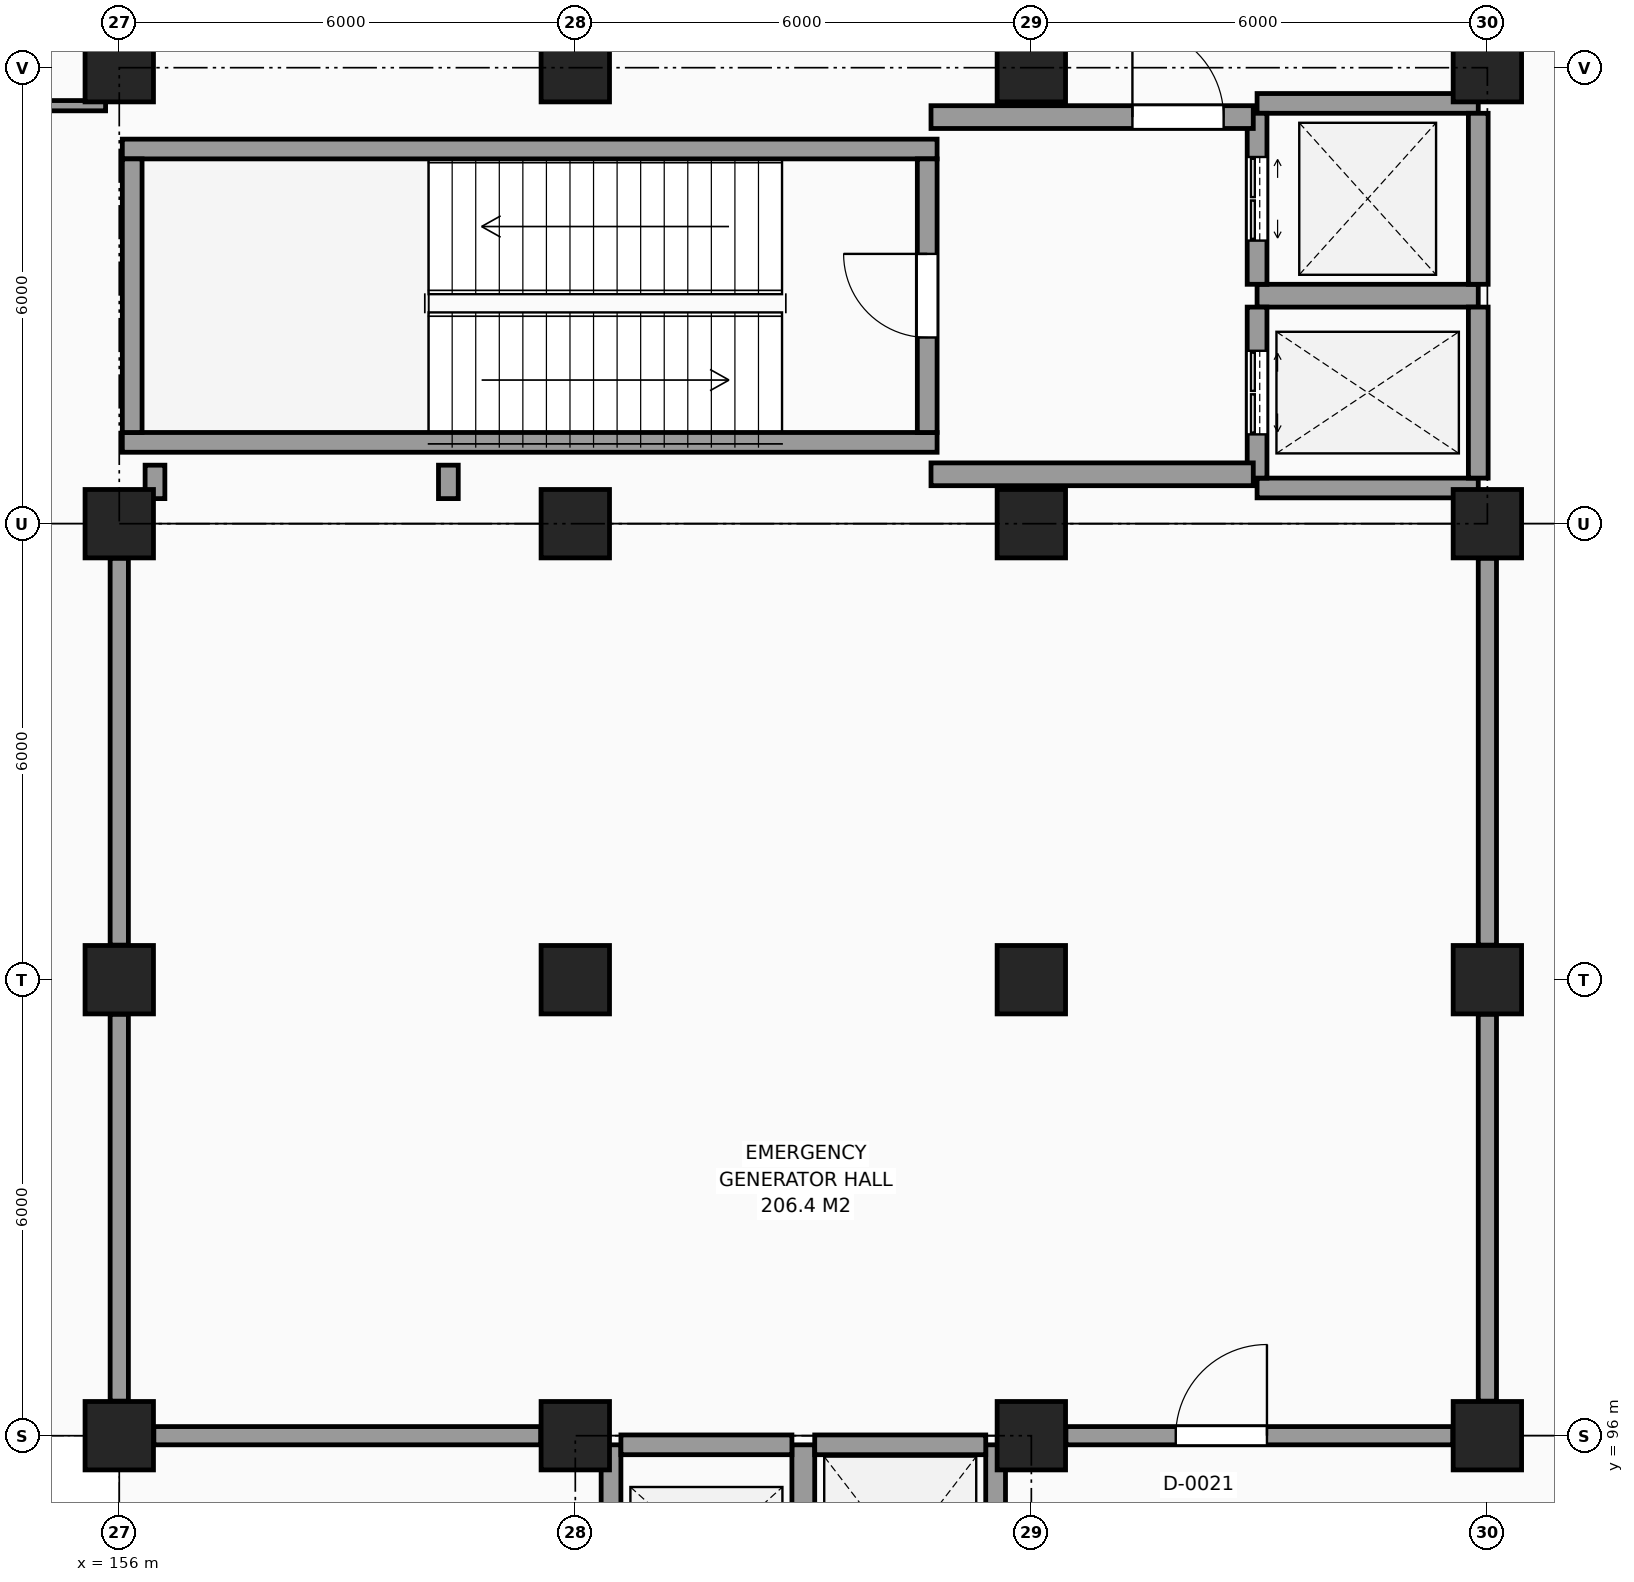
"""IFC4 building model, lengths in metres.
Left out: names, types, materials, properties, quantities, classifications, styles, units other than length and angle.
Written with IfcOpenShell. Run it as: python <this file> out.ifc"""

import sys

from ifc_helpers import new_model, si_unit, direction, frame, frame_2d, origin, origin_2d, place, context, subcontext, project, spatial, rectangle, extrude, element, fill, save


model = new_model("IFC4")
c1 = context("Model", 3, precision=1e-05, world=origin(), true_north=direction((0.0, 1.0)))
c2 = subcontext(c1, "Body", "Model", "MODEL_VIEW")
j1 = project(units=[si_unit("LENGTHUNIT", "METRE"), si_unit("PLANEANGLEUNIT", "RADIAN")], contexts=[c1])
p1 = place(None, origin())
s1 = spatial("IfcSite", under=j1, at=p1, CompositionType="ELEMENT")
p2 = place(p1, origin())
s2 = spatial("IfcBuilding", under=s1, at=p2, CompositionType="ELEMENT")
p3 = place(p2, frame((0.0, 0.0, -4.8)))
s3 = spatial("IfcBuildingStorey", under=s2, at=p3, CompositionType="ELEMENT", Elevation=-4.8)
for number, where, z_axis, x_axis in (
    (1, (156.0, 96.0, 0.0), (0.0, 0.0, 1.0), (1.0, 0.0, 0.0)),
    (2, (156.0, 102.0, 0.0), (0.0, 0.0, 1.0), (1.0, 0.0, 0.0)),
    (3, (156.0, 108.0, 0.0), (0.0, 0.0, 1.0), (1.0, 0.0, 0.0)),
    (4, (156.0, 114.0, 0.0), (0.0, 0.0, 1.0), (1.0, 0.0, 0.0)),
    (5, (162.0, 96.0, 0.0), (0.0, 0.0, 1.0), (1.0, 0.0, 0.0)),
    (6, (162.0, 102.0, 0.0), (0.0, 0.0, 1.0), (1.0, 0.0, 0.0)),
    (7, (162.0, 108.0, 0.0), (0.0, 0.0, 1.0), (1.0, 0.0, 0.0)),
    (8, (162.0, 114.0, 0.0), (0.0, 0.0, 1.0), (1.0, 0.0, 0.0)),
    (9, (168.0, 96.0, 0.0), (0.0, 0.0, 1.0), (1.0, 0.0, 0.0)),
    (10, (168.0, 102.0, 0.0), (0.0, 0.0, 1.0), (1.0, 0.0, 0.0)),
    (11, (168.0, 108.0, 0.0), (0.0, 0.0, 1.0), (1.0, 0.0, 0.0)),
    (12, (168.0, 114.0, 0.0), (0.0, 0.0, 1.0), (1.0, 0.0, 0.0)),
    (13, (174.0, 96.0, 0.0), (0.0, 0.0, 1.0), (1.0, 0.0, 0.0)),
    (14, (174.0, 102.0, 0.0), (0.0, 0.0, 1.0), (1.0, 0.0, 0.0)),
    (15, (174.0, 108.0, 0.0), (0.0, 0.0, 1.0), (1.0, 0.0, 0.0)),
    (16, (174.0, 114.0, 0.0), (0.0, 0.0, 1.0), (1.0, 0.0, 0.0)),
):
    element("IfcColumn", number, at=place(p3, frame(where, z_axis=z_axis, x_axis=x_axis)), inside=s3, PredefinedType="COLUMN", context=c2, shape_type="SweptSolid", body=[
        extrude(rectangle(XDim=0.9, YDim=0.9, at=origin_2d()), origin(), (0.0, 0.0, 1.0), 4.8),
    ])
for number, where, z_axis, x_axis in (
    (17, (156.04, 109.07, -0.5), (0.0, 0.0, 1.0), (1.0, 0.0, 0.0)),
    (18, (156.04, 112.93, -0.5), (0.0, 0.0, 1.0), (1.0, 0.0, 0.0)),
):
    element("IfcWall", number, at=place(p3, frame(where, z_axis=z_axis, x_axis=x_axis)), inside=s3, PredefinedType="SHEAR", context=c2, shape_type="SweptSolid", body=[
        extrude(rectangle(XDim=10.72, YDim=0.26, at=frame_2d((5.36, 0.0))), origin(), (0.0, 0.0, 1.0), 5.3),
    ])
p4 = place(p3, frame((156.17, 109.2, -0.5), z_axis=(0.0, 0.0, 1.0), x_axis=(0.0, 1.0, 0.0)))
e19 = element("IfcWall", 19, at=p4, inside=s3, PredefinedType="SHEAR", context=c2, shape_type="SweptSolid", body=[
    extrude(rectangle(XDim=3.6, YDim=0.26, at=frame_2d((1.8, 0.0))), origin(), (0.0, 0.0, 1.0), 5.3),
])
p5 = place(p3, frame((166.63, 109.2, -0.5), z_axis=(0.0, 0.0, 1.0), x_axis=(0.0, 1.0, 0.0)))
e20 = element("IfcWall", 20, at=p5, inside=s3, PredefinedType="SHEAR", context=c2, shape_type="SweptSolid", body=[
    extrude(rectangle(XDim=3.6, YDim=0.26, at=frame_2d((1.8, 0.0))), origin(), (0.0, 0.0, 1.0), 5.3),
])
p6 = place(p5, frame((1.25, 0.0, 0.5)))
e21 = element("IfcOpeningElement", 21, at=p6, cuts=e20, PredefinedType="OPENING", context=c2, shape_type="SweptSolid", body=[
    extrude(rectangle(XDim=1.1, YDim=2.15, at=frame_2d((0.55, 1.075))), frame((0.0, 0.14, 0.0), z_axis=(0.0, -1.0, 0.0), x_axis=(1.0, 0.0, 0.0)), (0.0, 0.0, 1.0), 0.28),
])
p7 = place(p3, frame((170.97, 108.47, -0.5), z_axis=(0.0, 0.0, 1.0), x_axis=(1.0, 0.0, 0.0)))
e22 = element("IfcWall", 22, at=p7, inside=s3, PredefinedType="SHEAR", context=c2, shape_type="SweptSolid", body=[
    extrude(rectangle(XDim=2.91, YDim=0.26, at=frame_2d((1.455, 0.0))), origin(), (0.0, 0.0, 1.0), 5.3),
])
p8 = place(p3, frame((170.97, 111.0, -0.5), z_axis=(0.0, 0.0, 1.0), x_axis=(1.0, 0.0, 0.0)))
e23 = element("IfcWall", 23, at=p8, inside=s3, PredefinedType="SHEAR", context=c2, shape_type="SweptSolid", body=[
    extrude(rectangle(XDim=2.91, YDim=0.3, at=frame_2d((1.455, 0.0))), origin(), (0.0, 0.0, 1.0), 5.3),
])
p9 = place(p3, frame((173.88, 108.6, -0.5), z_axis=(0.0, 0.0, 1.0), x_axis=(0.0, 1.0, 0.0)))
e24 = element("IfcWall", 24, at=p9, inside=s3, PredefinedType="SHEAR", context=c2, shape_type="SweptSolid", body=[
    extrude(rectangle(XDim=2.25, YDim=0.26, at=frame_2d((1.125, 0.0))), origin(), (0.0, 0.0, 1.0), 5.3),
])
p10 = place(p3, frame((170.97, 108.6, -0.5), z_axis=(0.0, 0.0, 1.0), x_axis=(0.0, 1.0, 0.0)))
e25 = element("IfcWall", 25, at=p10, inside=s3, PredefinedType="SHEAR", context=c2, shape_type="SweptSolid", body=[
    extrude(rectangle(XDim=2.25, YDim=0.26, at=frame_2d((1.125, 0.0))), origin(), (0.0, 0.0, 1.0), 5.3),
])
p11 = place(p10, frame((0.575, 0.0, 0.5)))
e26 = element("IfcOpeningElement", 26, at=p11, cuts=e25, PredefinedType="OPENING", context=c2, shape_type="SweptSolid", body=[
    extrude(rectangle(XDim=1.1, YDim=2.2, at=frame_2d((0.55, 1.1))), frame((0.0, 0.14, 0.0), z_axis=(0.0, -1.0, 0.0), x_axis=(1.0, 0.0, 0.0)), (0.0, 0.0, 1.0), 0.28),
])
p12 = place(p3, frame((170.97, 113.53, -0.5), z_axis=(0.0, 0.0, 1.0), x_axis=(1.0, 0.0, 0.0)))
e27 = element("IfcWall", 27, at=p12, inside=s3, PredefinedType="SHEAR", context=c2, shape_type="SweptSolid", body=[
    extrude(rectangle(XDim=2.91, YDim=0.26, at=frame_2d((1.455, 0.0))), origin(), (0.0, 0.0, 1.0), 5.3),
])
p13 = place(p3, frame((173.88, 111.15, -0.5), z_axis=(0.0, 0.0, 1.0), x_axis=(0.0, 1.0, 0.0)))
e28 = element("IfcWall", 28, at=p13, inside=s3, PredefinedType="SHEAR", context=c2, shape_type="SweptSolid", body=[
    extrude(rectangle(XDim=2.25, YDim=0.26, at=frame_2d((1.125, 0.0))), origin(), (0.0, 0.0, 1.0), 5.3),
])
p14 = place(p3, frame((170.97, 111.15, -0.5), z_axis=(0.0, 0.0, 1.0), x_axis=(0.0, 1.0, 0.0)))
e29 = element("IfcWall", 29, at=p14, inside=s3, PredefinedType="SHEAR", context=c2, shape_type="SweptSolid", body=[
    extrude(rectangle(XDim=2.25, YDim=0.26, at=frame_2d((1.125, 0.0))), origin(), (0.0, 0.0, 1.0), 5.3),
])
p15 = place(p14, frame((0.575, 0.0, 0.5)))
e30 = element("IfcOpeningElement", 30, at=p15, cuts=e29, PredefinedType="OPENING", context=c2, shape_type="SweptSolid", body=[
    extrude(rectangle(XDim=1.1, YDim=2.2, at=frame_2d((0.55, 1.1))), frame((0.0, 0.14, 0.0), z_axis=(0.0, -1.0, 0.0), x_axis=(1.0, 0.0, 0.0)), (0.0, 0.0, 1.0), 0.28),
])
for number, where, z_axis, x_axis in (
    (31, (156.47, 108.33, -0.5), (0.0, 0.0, 1.0), (0.0, 1.0, 0.0)),
    (32, (160.33, 108.33, -0.5), (0.0, 0.0, 1.0), (0.0, 1.0, 0.0)),
):
    element("IfcWall", number, at=place(p3, frame(where, z_axis=z_axis, x_axis=x_axis)), inside=s3, PredefinedType="SHEAR", context=c2, shape_type="SweptSolid", body=[
        extrude(rectangle(XDim=0.44, YDim=0.26, at=frame_2d((0.22, 0.0))), origin(), (0.0, 0.0, 1.0), 5.3),
    ])
p16 = place(p3, frame((166.68, 113.35, -0.5), z_axis=(0.0, 0.0, 1.0), x_axis=(1.0, 0.0, 0.0)))
e33 = element("IfcWall", 33, at=p16, inside=s3, PredefinedType="SHEAR", context=c2, shape_type="SweptSolid", body=[
    extrude(rectangle(XDim=4.24, YDim=0.3, at=frame_2d((2.12, 0.0))), origin(), (0.0, 0.0, 1.0), 5.3),
])
p17 = place(p16, frame((2.65, 0.0, 0.5)))
e34 = element("IfcOpeningElement", 34, at=p17, cuts=e33, PredefinedType="OPENING", context=c2, shape_type="SweptSolid", body=[
    extrude(rectangle(XDim=1.2, YDim=2.2, at=frame_2d((0.6, 1.1))), frame((0.0, 0.16, 0.0), z_axis=(0.0, -1.0, 0.0), x_axis=(1.0, 0.0, 0.0)), (0.0, 0.0, 1.0), 0.32),
])
p18 = place(p3, frame((166.68, 108.65, -0.5), z_axis=(0.0, 0.0, 1.0), x_axis=(1.0, 0.0, 0.0)))
e35 = element("IfcWall", 35, at=p18, inside=s3, PredefinedType="SHEAR", context=c2, shape_type="SweptSolid", body=[
    extrude(rectangle(XDim=4.24, YDim=0.3, at=frame_2d((2.12, 0.0))), origin(), (0.0, 0.0, 1.0), 5.3),
])
p19 = place(p3, frame((162.47, 92.97, -0.5), z_axis=(0.0, 0.0, 1.0), x_axis=(0.0, 1.0, 0.0)))
e36 = element("IfcWall", 36, at=p19, inside=s3, PredefinedType="SHEAR", context=c2, shape_type="SweptSolid", body=[
    extrude(rectangle(XDim=2.91, YDim=0.26, at=frame_2d((1.455, 0.0))), origin(), (0.0, 0.0, 1.0), 5.3),
])
p20 = place(p3, frame((165.0, 92.97, -0.5), z_axis=(0.0, 0.0, 1.0), x_axis=(0.0, 1.0, 0.0)))
e37 = element("IfcWall", 37, at=p20, inside=s3, PredefinedType="SHEAR", context=c2, shape_type="SweptSolid", body=[
    extrude(rectangle(XDim=2.91, YDim=0.3, at=frame_2d((1.455, 0.0))), origin(), (0.0, 0.0, 1.0), 5.3),
])
p21 = place(p3, frame((162.6, 95.88, -0.5), z_axis=(0.0, 0.0, 1.0), x_axis=(1.0, 0.0, 0.0)))
e38 = element("IfcWall", 38, at=p21, inside=s3, PredefinedType="SHEAR", context=c2, shape_type="SweptSolid", body=[
    extrude(rectangle(XDim=2.25, YDim=0.26, at=frame_2d((1.125, 0.0))), origin(), (0.0, 0.0, 1.0), 5.3),
])
p22 = place(p3, frame((167.53, 92.97, -0.5), z_axis=(0.0, 0.0, 1.0), x_axis=(0.0, 1.0, 0.0)))
e39 = element("IfcWall", 39, at=p22, inside=s3, PredefinedType="SHEAR", context=c2, shape_type="SweptSolid", body=[
    extrude(rectangle(XDim=2.91, YDim=0.26, at=frame_2d((1.455, 0.0))), origin(), (0.0, 0.0, 1.0), 5.3),
])
p23 = place(p3, frame((165.15, 95.88, -0.5), z_axis=(0.0, 0.0, 1.0), x_axis=(1.0, 0.0, 0.0)))
e40 = element("IfcWall", 40, at=p23, inside=s3, PredefinedType="SHEAR", context=c2, shape_type="SweptSolid", body=[
    extrude(rectangle(XDim=2.25, YDim=0.26, at=frame_2d((1.125, 0.0))), origin(), (0.0, 0.0, 1.0), 5.3),
])
p24 = place(p3, frame((156.0, 96.455, 0.0), z_axis=(0.0, 0.0, 1.0), x_axis=(0.0, 1.0, 0.0)))
e41 = element("IfcWall", 41, at=p24, inside=s3, PredefinedType="PARTITIONING", context=c2, shape_type="SweptSolid", body=[
    extrude(rectangle(XDim=5.09, YDim=0.24, at=frame_2d((2.545, 0.0))), origin(), (0.0, 0.0, 1.0), 3.8),
])
p25 = place(p3, frame((156.0, 102.455, 0.0), z_axis=(0.0, 0.0, 1.0), x_axis=(0.0, 1.0, 0.0)))
e42 = element("IfcWall", 42, at=p25, inside=s3, PredefinedType="PARTITIONING", context=c2, shape_type="SweptSolid", body=[
    extrude(rectangle(XDim=5.09, YDim=0.24, at=frame_2d((2.545, 0.0))), origin(), (0.0, 0.0, 1.0), 3.95),
])
p26 = place(p3, frame((174.0, 96.455, 0.0), z_axis=(0.0, 0.0, 1.0), x_axis=(0.0, 1.0, 0.0)))
e43 = element("IfcWall", 43, at=p26, inside=s3, PredefinedType="PARTITIONING", context=c2, shape_type="SweptSolid", body=[
    extrude(rectangle(XDim=5.09, YDim=0.24, at=frame_2d((2.545, 0.0))), origin(), (0.0, 0.0, 1.0), 3.8),
])
p27 = place(p3, frame((174.0, 102.455, 0.0), z_axis=(0.0, 0.0, 1.0), x_axis=(0.0, 1.0, 0.0)))
e44 = element("IfcWall", 44, at=p27, inside=s3, PredefinedType="PARTITIONING", context=c2, shape_type="SweptSolid", body=[
    extrude(rectangle(XDim=5.09, YDim=0.24, at=frame_2d((2.545, 0.0))), origin(), (0.0, 0.0, 1.0), 3.95),
])
p28 = place(p3, frame((156.455, 96.0, 0.0), z_axis=(0.0, 0.0, 1.0), x_axis=(1.0, 0.0, 0.0)))
e45 = element("IfcWall", 45, at=p28, inside=s3, PredefinedType="PARTITIONING", context=c2, shape_type="SweptSolid", body=[
    extrude(rectangle(XDim=5.09, YDim=0.24, at=frame_2d((2.545, 0.0))), origin(), (0.0, 0.0, 1.0), 3.8),
])
p29 = place(p3, frame((168.455, 96.0, 0.0), z_axis=(0.0, 0.0, 1.0), x_axis=(1.0, 0.0, 0.0)))
e46 = element("IfcWall", 46, at=p29, inside=s3, PredefinedType="PARTITIONING", context=c2, shape_type="SweptSolid", body=[
    extrude(rectangle(XDim=5.09, YDim=0.24, at=frame_2d((2.545, 0.0))), origin(), (0.0, 0.0, 1.0), 4.05),
])
p30 = place(p29, frame((1.445, 0.0, 0.0)))
e47 = element("IfcOpeningElement", 47, at=p30, cuts=e46, PredefinedType="OPENING", context=c2, shape_type="SweptSolid", body=[
    extrude(rectangle(XDim=1.2, YDim=2.2, at=frame_2d((0.6, 1.1))), frame((0.0, 0.13, 0.0), z_axis=(0.0, -1.0, 0.0), x_axis=(1.0, 0.0, 0.0)), (0.0, 0.0, 1.0), 0.26),
])
p31 = place(p3, frame((150.18, 113.5, 0.0), z_axis=(0.0, 0.0, 1.0), x_axis=(1.0, 0.0, 0.0)))
e48 = element("IfcWall", 48, at=p31, inside=s3, PredefinedType="PARTITIONING", context=c2, shape_type="SweptSolid", body=[
    extrude(rectangle(XDim=5.64, YDim=0.135, at=frame_2d((2.82, 0.0))), origin(), (0.0, 0.0, 1.0), 4.5),
])
p32 = place(p6, origin())
e49 = element("IfcDoor", 49, at=p32, inside=s3, OperationType="SINGLE_SWING_RIGHT", PredefinedType="DOOR", context=c2, shape_type="SweptSolid", body=[
    extrude(rectangle(XDim=1.1, YDim=2.15, at=frame_2d((0.55, 1.075))), frame((0.0, 0.025, 0.0), z_axis=(0.0, -1.0, 0.0), x_axis=(1.0, 0.0, 0.0)), (0.0, 0.0, 1.0), 0.05),
])
fill(e21, e49)
p33 = place(p11, origin())
e50 = element("IfcDoor", 50, at=p33, inside=s3, OperationType="DOUBLE_DOOR_SLIDING", PredefinedType="DOOR", context=c2, shape_type="SweptSolid", body=[
    extrude(rectangle(XDim=1.1, YDim=2.2, at=frame_2d((0.55, 1.1))), frame((0.0, 0.025, 0.0), z_axis=(0.0, -1.0, 0.0), x_axis=(1.0, 0.0, 0.0)), (0.0, 0.0, 1.0), 0.05),
])
fill(e26, e50)
p34 = place(p15, origin())
e51 = element("IfcDoor", 51, at=p34, inside=s3, OperationType="DOUBLE_DOOR_SLIDING", PredefinedType="DOOR", context=c2, shape_type="SweptSolid", body=[
    extrude(rectangle(XDim=1.1, YDim=2.2, at=frame_2d((0.55, 1.1))), frame((0.0, 0.025, 0.0), z_axis=(0.0, -1.0, 0.0), x_axis=(1.0, 0.0, 0.0)), (0.0, 0.0, 1.0), 0.05),
])
fill(e30, e51)
p35 = place(p17, origin())
e52 = element("IfcDoor", 52, at=p35, inside=s3, OperationType="SINGLE_SWING_LEFT", PredefinedType="DOOR", context=c2, shape_type="SweptSolid", body=[
    extrude(rectangle(XDim=1.2, YDim=2.2, at=frame_2d((0.6, 1.1))), frame((0.0, 0.025, 0.0), z_axis=(0.0, -1.0, 0.0), x_axis=(1.0, 0.0, 0.0)), (0.0, 0.0, 1.0), 0.05),
])
fill(e34, e52)
p36 = place(p30, origin())
e53 = element("IfcDoor", 53, at=p36, inside=s3, OperationType="SINGLE_SWING_RIGHT", PredefinedType="DOOR", context=c2, shape_type="SweptSolid", body=[
    extrude(rectangle(XDim=1.2, YDim=2.2, at=frame_2d((0.6, 1.1))), frame((0.0, 0.025, 0.0), z_axis=(0.0, -1.0, 0.0), x_axis=(1.0, 0.0, 0.0)), (0.0, 0.0, 1.0), 0.05),
])
fill(e47, e53)
save(model, sys.argv[1])
